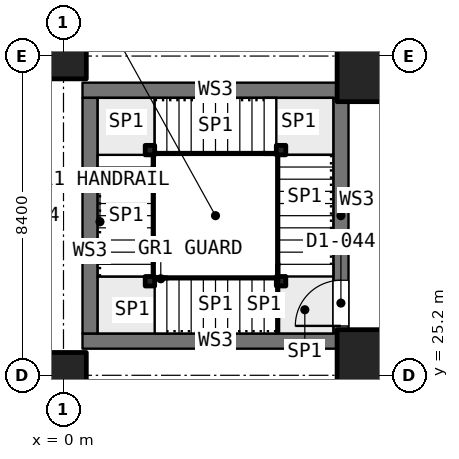
"""IFC4 building model, lengths in metres.
Left out: names, types, materials, properties, quantities, classifications, styles, units other than length and angle.
Written with IfcOpenShell. Run it as: python <this file> out.ifc"""

import sys

from ifc_helpers import new_model, si_unit, direction, frame, frame_2d, origin, origin_2d, place, context, subcontext, project, spatial, rectangle, extrude, element, fill, save


model = new_model("IFC4")
c1 = context("Model", 3, precision=1e-05, world=origin(), true_north=direction((0.0, 1.0)))
c2 = subcontext(c1, "Body", "Model", "MODEL_VIEW")
j1 = project(units=[si_unit("LENGTHUNIT", "METRE"), si_unit("PLANEANGLEUNIT", "RADIAN")], contexts=[c1])
p1 = place(None, origin())
s1 = spatial("IfcSite", under=j1, at=p1, CompositionType="ELEMENT")
p2 = place(p1, origin())
s2 = spatial("IfcBuilding", under=s1, at=p2, CompositionType="ELEMENT")
p3 = place(p2, frame((0.0, 0.0, 15.4)))
s3 = spatial("IfcBuildingStorey", under=s2, at=p3, CompositionType="ELEMENT", Elevation=15.4)
for number, where, z_axis, x_axis in (
    (1, (0.0, 25.2, 0.0), (0.0, 0.0, 1.0), (1.0, 0.0, 0.0)),
    (2, (0.0, 33.6, 0.0), (0.0, 0.0, 1.0), (1.0, 0.0, 0.0)),
):
    element("IfcColumn", number, at=place(p3, frame(where, z_axis=z_axis, x_axis=x_axis)), inside=s3, PredefinedType="COLUMN", context=c2, shape_type="SweptSolid", body=[
        extrude(rectangle(XDim=1.2, YDim=1.2, at=origin_2d()), origin(), (0.0, 0.0, 1.0), 5.0),
    ])
for number, where, z_axis, x_axis in (
    (3, (8.4, 25.2, 0.0), (0.0, 0.0, 1.0), (1.0, 0.0, 0.0)),
    (4, (8.4, 33.6, 0.0), (0.0, 0.0, 1.0), (1.0, 0.0, 0.0)),
):
    element("IfcColumn", number, at=place(p3, frame(where, z_axis=z_axis, x_axis=x_axis)), inside=s3, PredefinedType="COLUMN", context=c2, shape_type="SweptSolid", body=[
        extrude(rectangle(XDim=2.4, YDim=2.4, at=origin_2d()), origin(), (0.0, 0.0, 1.0), 5.0),
    ])
for number, where, z_axis, x_axis in (
    (5, (0.5, 26.1, 0.0), (0.0, 0.0, 1.0), (1.0, 0.0, 0.0)),
    (6, (0.5, 32.7, 0.0), (0.0, 0.0, 1.0), (1.0, 0.0, 0.0)),
):
    element("IfcWall", number, at=place(p3, frame(where, z_axis=z_axis, x_axis=x_axis)), inside=s3, PredefinedType="SOLIDWALL", context=c2, shape_type="SweptSolid", body=[
        extrude(rectangle(XDim=7.0, YDim=0.4, at=frame_2d((3.5, 0.0))), origin(), (0.0, 0.0, 1.0), 4.7),
    ])
p4 = place(p3, frame((0.7, 26.3, 0.0), z_axis=(0.0, 0.0, 1.0), x_axis=(0.0, 1.0, 0.0)))
e7 = element("IfcWall", 7, at=p4, inside=s3, PredefinedType="SOLIDWALL", context=c2, shape_type="SweptSolid", body=[
    extrude(rectangle(XDim=6.2, YDim=0.4, at=frame_2d((3.1, 0.0))), origin(), (0.0, 0.0, 1.0), 4.7),
])
p5 = place(p3, frame((7.3, 26.3, 0.0), z_axis=(0.0, 0.0, 1.0), x_axis=(0.0, 1.0, 0.0)))
e8 = element("IfcWall", 8, at=p5, inside=s3, PredefinedType="SOLIDWALL", context=c2, shape_type="SweptSolid", body=[
    extrude(rectangle(XDim=6.2, YDim=0.4, at=frame_2d((3.1, 0.0))), origin(), (0.0, 0.0, 1.0), 4.7),
])
p6 = place(p5, frame((0.2, 0.0, 0.0)))
e9 = element("IfcOpeningElement", 9, at=p6, cuts=e8, PredefinedType="OPENING", context=c2, shape_type="SweptSolid", body=[
    extrude(rectangle(XDim=1.2, YDim=2.1, at=frame_2d((0.6, 1.05))), frame((0.0, 0.21, 0.0), z_axis=(0.0, -1.0, 0.0), x_axis=(1.0, 0.0, 0.0)), (0.0, 0.0, 1.0), 0.42),
])
for number, where, z_axis, x_axis in (
    (10, (5.725, 27.675, 0.0), (0.0, 0.0, 1.0), (1.0, 0.0, 0.0)),
    (11, (2.275, 27.675, 0.0), (0.0, 0.0, 1.0), (1.0, 0.0, 0.0)),
    (12, (2.275, 31.125, 0.0), (0.0, 0.0, 1.0), (1.0, 0.0, 0.0)),
    (13, (5.725, 31.125, 0.0), (0.0, 0.0, 1.0), (1.0, 0.0, 0.0)),
):
    element("IfcColumn", number, at=place(p3, frame(where, z_axis=z_axis, x_axis=x_axis)), inside=s3, PredefinedType="COLUMN", context=c2, shape_type="SweptSolid", body=[
        extrude(rectangle(XDim=0.25, YDim=0.25, at=origin_2d()), origin(), (0.0, 0.0, 1.0), 5.0),
    ])
p7 = place(p6, origin())
e14 = element("IfcDoor", 14, at=p7, inside=s3, OperationType="SINGLE_SWING_RIGHT", PredefinedType="DOOR", context=c2, shape_type="SweptSolid", body=[
    extrude(rectangle(XDim=1.2, YDim=2.1, at=frame_2d((0.6, 1.05))), frame((0.0, 0.025, 0.0), z_axis=(0.0, -1.0, 0.0), x_axis=(1.0, 0.0, 0.0)), (0.0, 0.0, 1.0), 0.05),
])
fill(e9, e14)
save(model, sys.argv[1])
